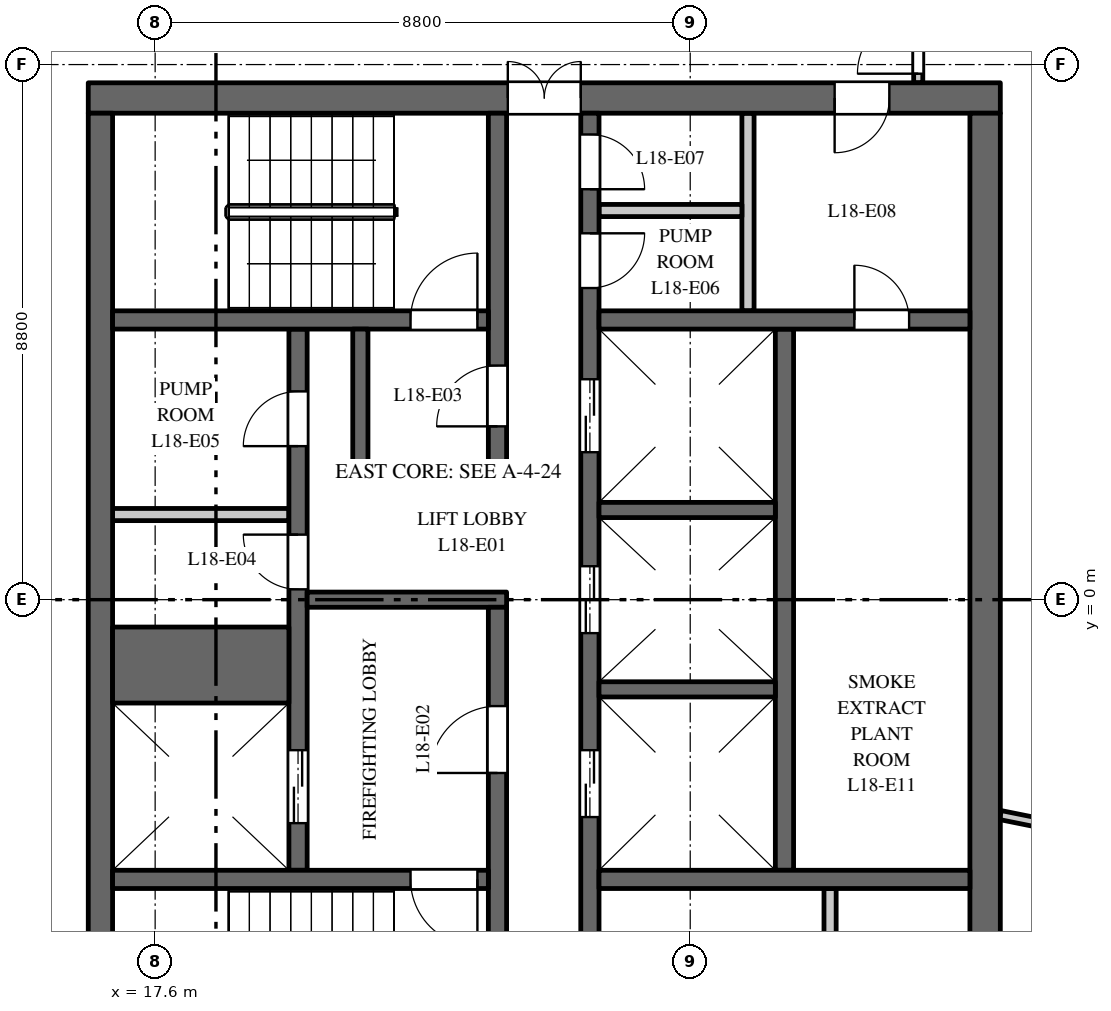
"""IFC4 building model, lengths in metres.
Left out: names, types, materials, properties, quantities, classifications, styles, units other than length and angle.
Written with IfcOpenShell. Run it as: python <this file> out.ifc"""

import sys

from ifc_helpers import new_model, si_unit, direction, frame, frame_2d, origin, place, context, subcontext, project, spatial, rectangle, extrude, element, fill, save


model = new_model("IFC4")
c1 = context("Model", 3, precision=1e-05, world=origin(), true_north=direction((0.0, 1.0)))
c2 = subcontext(c1, "Body", "Model", "MODEL_VIEW")
j1 = project(units=[si_unit("LENGTHUNIT", "METRE"), si_unit("PLANEANGLEUNIT", "RADIAN")], contexts=[c1])
p1 = place(None, origin())
s1 = spatial("IfcSite", under=j1, at=p1, CompositionType="ELEMENT")
p2 = place(p1, origin())
s2 = spatial("IfcBuilding", under=s1, at=p2, CompositionType="ELEMENT")
p3 = place(p2, frame((0.0, 0.0, 82.5)))
s3 = spatial("IfcBuildingStorey", under=s2, at=p3, CompositionType="ELEMENT", Elevation=82.5)
p4 = place(p3, frame((16.5, 8.25, 0.0), z_axis=(0.0, 0.0, 1.0), x_axis=(1.0, 0.0, 0.0)))
e1 = element("IfcWall", 1, at=p4, inside=s3, PredefinedType="SHEAR", context=c2, shape_type="SweptSolid", body=[
    extrude(rectangle(XDim=15.0, YDim=0.5, at=frame_2d((7.5, 0.0))), origin(), (0.0, 0.0, 1.0), 5.2),
])
p5 = place(p4, frame((6.9, 0.0, 0.0)))
e2 = element("IfcOpeningElement", 2, at=p5, cuts=e1, PredefinedType="OPENING", context=c2, shape_type="SweptSolid", body=[
    extrude(rectangle(XDim=1.2, YDim=2.1, at=frame_2d((0.6, 1.05))), frame((0.0, 0.26, 0.0), z_axis=(0.0, -1.0, 0.0), x_axis=(1.0, 0.0, 0.0)), (0.0, 0.0, 1.0), 0.52),
])
p6 = place(p4, frame((12.275, 0.0, 0.0)))
e3 = element("IfcOpeningElement", 3, at=p6, cuts=e1, PredefinedType="OPENING", context=c2, shape_type="SweptSolid", body=[
    extrude(rectangle(XDim=0.9, YDim=2.1, at=frame_2d((0.45, 1.05))), frame((0.0, 0.26, 0.0), z_axis=(0.0, -1.0, 0.0), x_axis=(1.0, 0.0, 0.0)), (0.0, 0.0, 1.0), 0.52),
])
p7 = place(p3, frame((16.9, 1.4, 0.0), z_axis=(0.0, 0.0, 1.0), x_axis=(1.0, 0.0, 0.0)))
e4 = element("IfcWall", 4, at=p7, inside=s3, PredefinedType="PARTITIONING", context=c2, shape_type="SweptSolid", body=[
    extrude(rectangle(XDim=2.9, YDim=0.2, at=frame_2d((1.45, 0.0))), origin(), (0.0, 0.0, 1.0), 5.2),
])
p8 = place(p3, frame((27.95, -4.45, 0.0), z_axis=(0.0, 0.0, 1.0), x_axis=(0.0, 1.0, 0.0)))
e5 = element("IfcWall", 5, at=p8, inside=s3, PredefinedType="SHEAR", context=c2, shape_type="SweptSolid", body=[
    extrude(rectangle(XDim=8.9, YDim=0.3, at=frame_2d((4.45, 0.0))), origin(), (0.0, 0.0, 1.0), 5.2),
])
p9 = place(p3, frame((19.95, -4.45, 0.0), z_axis=(0.0, 0.0, 1.0), x_axis=(0.0, 1.0, 0.0)))
e6 = element("IfcWall", 6, at=p9, inside=s3, PredefinedType="SHEAR", context=c2, shape_type="SweptSolid", body=[
    extrude(rectangle(XDim=8.9, YDim=0.3, at=frame_2d((4.45, 0.0))), origin(), (0.0, 0.0, 1.0), 5.2),
])
p10 = place(p9, frame((0.775, 0.0, 0.0)))
e7 = element("IfcOpeningElement", 7, at=p10, cuts=e6, PredefinedType="OPENING", context=c2, shape_type="SweptSolid", body=[
    extrude(rectangle(XDim=1.2, YDim=2.1, at=frame_2d((0.6, 1.05))), frame((0.0, 0.16, 0.0), z_axis=(0.0, -1.0, 0.0), x_axis=(1.0, 0.0, 0.0)), (0.0, 0.0, 1.0), 0.32),
])
p11 = place(p9, frame((4.62, 0.0, 0.0)))
e8 = element("IfcOpeningElement", 8, at=p11, cuts=e6, PredefinedType="OPENING", context=c2, shape_type="SweptSolid", body=[
    extrude(rectangle(XDim=0.9, YDim=2.1, at=frame_2d((0.45, 1.05))), frame((0.0, 0.16, 0.0), z_axis=(0.0, -1.0, 0.0), x_axis=(1.0, 0.0, 0.0)), (0.0, 0.0, 1.0), 0.32),
])
p12 = place(p9, frame((6.975, 0.0, 0.0)))
e9 = element("IfcOpeningElement", 9, at=p12, cuts=e6, PredefinedType="OPENING", context=c2, shape_type="SweptSolid", body=[
    extrude(rectangle(XDim=0.9, YDim=2.1, at=frame_2d((0.45, 1.05))), frame((0.0, 0.16, 0.0), z_axis=(0.0, -1.0, 0.0), x_axis=(1.0, 0.0, 0.0)), (0.0, 0.0, 1.0), 0.32),
])
p13 = place(p3, frame((24.75, -8.0, 0.0), z_axis=(0.0, 0.0, 1.0), x_axis=(0.0, 1.0, 0.0)))
e10 = element("IfcWall", 10, at=p13, inside=s3, PredefinedType="SHEAR", context=c2, shape_type="SweptSolid", body=[
    extrude(rectangle(XDim=16.0, YDim=0.3, at=frame_2d((8.0, 0.0))), origin(), (0.0, 0.0, 1.0), 5.2),
])
p14 = place(p13, frame((4.425, 0.0, 0.0)))
e11 = element("IfcOpeningElement", 11, at=p14, cuts=e10, PredefinedType="OPENING", context=c2, shape_type="SweptSolid", body=[
    extrude(rectangle(XDim=1.1, YDim=2.1, at=frame_2d((0.55, 1.05))), frame((0.0, 0.16, 0.0), z_axis=(0.0, -1.0, 0.0), x_axis=(1.0, 0.0, 0.0)), (0.0, 0.0, 1.0), 0.32),
])
p15 = place(p13, frame((7.45, 0.0, 0.0)))
e12 = element("IfcOpeningElement", 12, at=p15, cuts=e10, PredefinedType="OPENING", context=c2, shape_type="SweptSolid", body=[
    extrude(rectangle(XDim=1.1, YDim=2.1, at=frame_2d((0.55, 1.05))), frame((0.0, 0.16, 0.0), z_axis=(0.0, -1.0, 0.0), x_axis=(1.0, 0.0, 0.0)), (0.0, 0.0, 1.0), 0.32),
])
p16 = place(p13, frame((10.425, 0.0, 0.0)))
e13 = element("IfcOpeningElement", 13, at=p16, cuts=e10, PredefinedType="OPENING", context=c2, shape_type="SweptSolid", body=[
    extrude(rectangle(XDim=1.2, YDim=2.1, at=frame_2d((0.6, 1.05))), frame((0.0, 0.16, 0.0), z_axis=(0.0, -1.0, 0.0), x_axis=(1.0, 0.0, 0.0)), (0.0, 0.0, 1.0), 0.32),
])
p17 = place(p13, frame((13.125, 0.0, 0.0)))
e14 = element("IfcOpeningElement", 14, at=p17, cuts=e10, PredefinedType="OPENING", context=c2, shape_type="SweptSolid", body=[
    extrude(rectangle(XDim=0.9, YDim=2.1, at=frame_2d((0.45, 1.05))), frame((0.0, 0.16, 0.0), z_axis=(0.0, -1.0, 0.0), x_axis=(1.0, 0.0, 0.0)), (0.0, 0.0, 1.0), 0.32),
])
p18 = place(p13, frame((14.75, 0.0, 0.0)))
e15 = element("IfcOpeningElement", 15, at=p18, cuts=e10, PredefinedType="OPENING", context=c2, shape_type="SweptSolid", body=[
    extrude(rectangle(XDim=0.9, YDim=2.1, at=frame_2d((0.45, 1.05))), frame((0.0, 0.16, 0.0), z_axis=(0.0, -1.0, 0.0), x_axis=(1.0, 0.0, 0.0)), (0.0, 0.0, 1.0), 0.32),
])
p19 = place(p13, frame((1.35, 0.0, 0.0)))
e16 = element("IfcOpeningElement", 16, at=p19, cuts=e10, PredefinedType="OPENING", context=c2, shape_type="SweptSolid", body=[
    extrude(rectangle(XDim=0.9, YDim=2.1, at=frame_2d((0.45, 1.05))), frame((0.0, 0.16, 0.0), z_axis=(0.0, -1.0, 0.0), x_axis=(1.0, 0.0, 0.0)), (0.0, 0.0, 1.0), 0.32),
])
p20 = place(p3, frame((20.1, 0.0, 0.0), z_axis=(0.0, 0.0, 1.0), x_axis=(1.0, 0.0, 0.0)))
e17 = element("IfcWall", 17, at=p20, inside=s3, PredefinedType="SHEAR", context=c2, shape_type="SweptSolid", body=[
    extrude(rectangle(XDim=3.28, YDim=0.25, at=frame_2d((1.64, 0.0))), origin(), (0.0, 0.0, 1.0), 5.2),
])
p21 = place(p3, frame((16.7, -8.0, 0.0), z_axis=(0.0, 0.0, 1.0), x_axis=(0.0, 1.0, 0.0)))
e18 = element("IfcWall", 18, at=p21, inside=s3, PredefinedType="SHEAR", context=c2, shape_type="SweptSolid", body=[
    extrude(rectangle(XDim=16.0, YDim=0.4, at=frame_2d((8.0, 0.0))), origin(), (0.0, 0.0, 1.0), 5.2),
])
p22 = place(p3, frame((31.25, -8.0, 0.0), z_axis=(0.0, 0.0, 1.0), x_axis=(0.0, 1.0, 0.0)))
e19 = element("IfcWall", 19, at=p22, inside=s3, PredefinedType="SHEAR", context=c2, shape_type="SweptSolid", body=[
    extrude(rectangle(XDim=16.0, YDim=0.5, at=frame_2d((8.0, 0.0))), origin(), (0.0, 0.0, 1.0), 5.2),
])
p23 = place(p3, frame((24.9, 4.6, 0.0), z_axis=(0.0, 0.0, 1.0), x_axis=(1.0, 0.0, 0.0)))
e20 = element("IfcWall", 20, at=p23, inside=s3, PredefinedType="SHEAR", context=c2, shape_type="SweptSolid", body=[
    extrude(rectangle(XDim=6.1, YDim=0.3, at=frame_2d((3.05, 0.0))), origin(), (0.0, 0.0, 1.0), 5.2),
])
p24 = place(p23, frame((4.2, 0.0, 0.0)))
e21 = element("IfcOpeningElement", 21, at=p24, cuts=e20, PredefinedType="OPENING", context=c2, shape_type="SweptSolid", body=[
    extrude(rectangle(XDim=0.9, YDim=2.1, at=frame_2d((0.45, 1.05))), frame((0.0, 0.16, 0.0), z_axis=(0.0, -1.0, 0.0), x_axis=(1.0, 0.0, 0.0)), (0.0, 0.0, 1.0), 0.32),
])
for number, where, z_axis, x_axis in (
    (22, (27.35, 4.75, 0.0), (0.0, 0.0, 1.0), (0.0, 1.0, 0.0)),
    (23, (28.7, -8.0, 0.0), (0.0, 0.0, 1.0), (0.0, 1.0, 0.0)),
):
    element("IfcWall", number, at=place(p3, frame(where, z_axis=z_axis, x_axis=x_axis)), inside=s3, PredefinedType="PARTITIONING", context=c2, shape_type="SweptSolid", body=[
        extrude(rectangle(XDim=3.25, YDim=0.2, at=frame_2d((1.625, 0.0))), origin(), (0.0, 0.0, 1.0), 5.2),
    ])
p25 = place(p3, frame((24.9, 6.4, 0.0), z_axis=(0.0, 0.0, 1.0), x_axis=(1.0, 0.0, 0.0)))
e24 = element("IfcWall", 24, at=p25, inside=s3, PredefinedType="PARTITIONING", context=c2, shape_type="SweptSolid", body=[
    extrude(rectangle(XDim=2.35, YDim=0.2, at=frame_2d((1.175, 0.0))), origin(), (0.0, 0.0, 1.0), 5.2),
])
p26 = place(p3, frame((24.9, -4.6, 0.0), z_axis=(0.0, 0.0, 1.0), x_axis=(1.0, 0.0, 0.0)))
e25 = element("IfcWall", 25, at=p26, inside=s3, PredefinedType="SHEAR", context=c2, shape_type="SweptSolid", body=[
    extrude(rectangle(XDim=6.1, YDim=0.3, at=frame_2d((3.05, 0.0))), origin(), (0.0, 0.0, 1.0), 5.2),
])
p27 = place(p3, frame((16.9, -1.075, 0.0), z_axis=(0.0, 0.0, 1.0), x_axis=(1.0, 0.0, 0.0)))
e26 = element("IfcWall", 26, at=p27, inside=s3, PredefinedType="SHEAR", context=c2, shape_type="SweptSolid", body=[
    extrude(rectangle(XDim=2.9, YDim=1.25, at=frame_2d((1.45, 0.0))), origin(), (0.0, 0.0, 1.0), 5.2),
])
for number, where, z_axis, x_axis in (
    (27, (24.9, -1.475, 0.0), (0.0, 0.0, 1.0), (1.0, 0.0, 0.0)),
    (28, (24.9, 1.475, 0.0), (0.0, 0.0, 1.0), (1.0, 0.0, 0.0)),
):
    element("IfcWall", number, at=place(p3, frame(where, z_axis=z_axis, x_axis=x_axis)), inside=s3, PredefinedType="SHEAR", context=c2, shape_type="SweptSolid", body=[
        extrude(rectangle(XDim=2.9, YDim=0.25, at=frame_2d((1.45, 0.0))), origin(), (0.0, 0.0, 1.0), 5.2),
    ])
p28 = place(p3, frame((23.23, 2.25, 0.0), z_axis=(0.0, 0.0, 1.0), x_axis=(0.0, 1.0, 0.0)))
e29 = element("IfcWall", 29, at=p28, inside=s3, PredefinedType="SHEAR", context=c2, shape_type="SweptSolid", body=[
    extrude(rectangle(XDim=5.75, YDim=0.3, at=frame_2d((2.875, 0.0))), origin(), (0.0, 0.0, 1.0), 5.2),
])
p29 = place(p28, frame((0.6, 0.0, 0.0)))
e30 = element("IfcOpeningElement", 30, at=p29, cuts=e29, PredefinedType="OPENING", context=c2, shape_type="SweptSolid", body=[
    extrude(rectangle(XDim=1.0, YDim=2.1, at=frame_2d((0.5, 1.05))), frame((0.0, 0.16, 0.0), z_axis=(0.0, -1.0, 0.0), x_axis=(1.0, 0.0, 0.0)), (0.0, 0.0, 1.0), 0.32),
])
p30 = place(p3, frame((23.23, -8.0, 0.0), z_axis=(0.0, 0.0, 1.0), x_axis=(0.0, 1.0, 0.0)))
e31 = element("IfcWall", 31, at=p30, inside=s3, PredefinedType="SHEAR", context=c2, shape_type="SweptSolid", body=[
    extrude(rectangle(XDim=7.875, YDim=0.3, at=frame_2d((3.938, 0.0))), origin(), (0.0, 0.0, 1.0), 5.2),
])
p31 = place(p30, frame((5.15, 0.0, 0.0)))
e32 = element("IfcOpeningElement", 32, at=p31, cuts=e31, PredefinedType="OPENING", context=c2, shape_type="SweptSolid", body=[
    extrude(rectangle(XDim=1.1, YDim=2.1, at=frame_2d((0.55, 1.05))), frame((0.0, 0.16, 0.0), z_axis=(0.0, -1.0, 0.0), x_axis=(1.0, 0.0, 0.0)), (0.0, 0.0, 1.0), 0.32),
])
p32 = place(p3, frame((16.9, 4.6, 0.0), z_axis=(0.0, 0.0, 1.0), x_axis=(1.0, 0.0, 0.0)))
e33 = element("IfcWall", 33, at=p32, inside=s3, PredefinedType="SHEAR", context=c2, shape_type="SweptSolid", body=[
    extrude(rectangle(XDim=6.18, YDim=0.3, at=frame_2d((3.09, 0.0))), origin(), (0.0, 0.0, 1.0), 5.2),
])
p33 = place(p32, frame((4.9, 0.0, 0.0)))
e34 = element("IfcOpeningElement", 34, at=p33, cuts=e33, PredefinedType="OPENING", context=c2, shape_type="SweptSolid", body=[
    extrude(rectangle(XDim=1.1, YDim=2.1, at=frame_2d((0.55, 1.05))), frame((0.0, 0.16, 0.0), z_axis=(0.0, -1.0, 0.0), x_axis=(1.0, 0.0, 0.0)), (0.0, 0.0, 1.0), 0.32),
])
p34 = place(p3, frame((16.9, -4.6, 0.0), z_axis=(0.0, 0.0, 1.0), x_axis=(1.0, 0.0, 0.0)))
e35 = element("IfcWall", 35, at=p34, inside=s3, PredefinedType="SHEAR", context=c2, shape_type="SweptSolid", body=[
    extrude(rectangle(XDim=6.18, YDim=0.3, at=frame_2d((3.09, 0.0))), origin(), (0.0, 0.0, 1.0), 5.2),
])
p35 = place(p34, frame((4.9, 0.0, 0.0)))
e36 = element("IfcOpeningElement", 36, at=p35, cuts=e35, PredefinedType="OPENING", context=c2, shape_type="SweptSolid", body=[
    extrude(rectangle(XDim=1.1, YDim=2.1, at=frame_2d((0.55, 1.05))), frame((0.0, 0.16, 0.0), z_axis=(0.0, -1.0, 0.0), x_axis=(1.0, 0.0, 0.0)), (0.0, 0.0, 1.0), 0.32),
])
p36 = place(p3, frame((20.85, 2.125, 0.0), z_axis=(0.0, 0.0, 1.0), x_axis=(1.0, 0.0, 0.0)))
e37 = element("IfcWall", 37, at=p36, inside=s3, PredefinedType="SHEAR", context=c2, shape_type="SweptSolid", body=[
    extrude(rectangle(XDim=2.53, YDim=0.25, at=frame_2d((1.265, 0.0))), origin(), (0.0, 0.0, 1.0), 5.2),
])
p37 = place(p3, frame((20.975, 2.25, 0.0), z_axis=(0.0, 0.0, 1.0), x_axis=(0.0, 1.0, 0.0)))
e38 = element("IfcWall", 38, at=p37, inside=s3, PredefinedType="SHEAR", context=c2, shape_type="SweptSolid", body=[
    extrude(rectangle(XDim=2.2, YDim=0.25, at=frame_2d((1.1, 0.0))), origin(), (0.0, 0.0, 1.0), 5.2),
])
p38 = place(p3, frame((31.5, -3.542, 0.0), z_axis=(0.0, 0.0, 1.0), x_axis=(0.98034430806, -0.197294291997, 0.0)))
e39 = element("IfcWall", 39, at=p38, inside=s3, PredefinedType="PARTITIONING", context=c2, shape_type="SweptSolid", body=[
    extrude(rectangle(XDim=3.188, YDim=0.15, at=frame_2d((1.594, 0.0))), origin(), (0.0, 0.0, 1.0), 5.2),
])
p39 = place(p3, frame((30.15, 8.5, 0.0), z_axis=(0.0, 0.0, 1.0), x_axis=(0.0, 1.0, 0.0)))
e40 = element("IfcWall", 40, at=p39, inside=s3, PredefinedType="PARTITIONING", context=c2, shape_type="SweptSolid", body=[
    extrude(rectangle(XDim=2.2, YDim=0.15, at=frame_2d((1.1, 0.0))), origin(), (0.0, 0.0, 1.0), 5.2),
])
p40 = place(p39, frame((0.15, 0.0, 0.0)))
e41 = element("IfcOpeningElement", 41, at=p40, cuts=e40, PredefinedType="OPENING", context=c2, shape_type="SweptSolid", body=[
    extrude(rectangle(XDim=1.0, YDim=2.1, at=frame_2d((0.5, 1.05))), frame((0.0, 0.085, 0.0), z_axis=(0.0, -1.0, 0.0), x_axis=(1.0, 0.0, 0.0)), (0.0, 0.0, 1.0), 0.17),
])
p41 = place(p10, origin())
e42 = element("IfcDoor", 42, at=p41, inside=s3, OperationType="DOUBLE_DOOR_SLIDING", PredefinedType="DOOR", context=c2, shape_type="SweptSolid", body=[
    extrude(rectangle(XDim=1.2, YDim=2.1, at=frame_2d((0.6, 1.05))), frame((0.0, 0.025, 0.0), z_axis=(0.0, -1.0, 0.0), x_axis=(1.0, 0.0, 0.0)), (0.0, 0.0, 1.0), 0.05),
])
fill(e7, e42)
p42 = place(p14, origin())
e43 = element("IfcDoor", 43, at=p42, inside=s3, OperationType="DOUBLE_DOOR_SLIDING", PredefinedType="DOOR", context=c2, shape_type="SweptSolid", body=[
    extrude(rectangle(XDim=1.1, YDim=2.1, at=frame_2d((0.55, 1.05))), frame((0.0, 0.025, 0.0), z_axis=(0.0, -1.0, 0.0), x_axis=(1.0, 0.0, 0.0)), (0.0, 0.0, 1.0), 0.05),
])
fill(e11, e43)
p43 = place(p15, origin())
e44 = element("IfcDoor", 44, at=p43, inside=s3, OperationType="DOUBLE_DOOR_SLIDING", PredefinedType="DOOR", context=c2, shape_type="SweptSolid", body=[
    extrude(rectangle(XDim=1.1, YDim=2.1, at=frame_2d((0.55, 1.05))), frame((0.0, 0.025, 0.0), z_axis=(0.0, -1.0, 0.0), x_axis=(1.0, 0.0, 0.0)), (0.0, 0.0, 1.0), 0.05),
])
fill(e12, e44)
p44 = place(p16, origin())
e45 = element("IfcDoor", 45, at=p44, inside=s3, OperationType="DOUBLE_DOOR_SLIDING", PredefinedType="DOOR", context=c2, shape_type="SweptSolid", body=[
    extrude(rectangle(XDim=1.2, YDim=2.1, at=frame_2d((0.6, 1.05))), frame((0.0, 0.025, 0.0), z_axis=(0.0, -1.0, 0.0), x_axis=(1.0, 0.0, 0.0)), (0.0, 0.0, 1.0), 0.05),
])
fill(e13, e45)
p45 = place(p33, origin())
e46 = element("IfcDoor", 46, at=p45, inside=s3, OperationType="SINGLE_SWING_LEFT", PredefinedType="DOOR", context=c2, shape_type="SweptSolid", body=[
    extrude(rectangle(XDim=1.1, YDim=2.1, at=frame_2d((0.55, 1.05))), frame((0.0, 0.025, 0.0), z_axis=(0.0, -1.0, 0.0), x_axis=(1.0, 0.0, 0.0)), (0.0, 0.0, 1.0), 0.05),
])
fill(e34, e46)
p46 = place(p35, origin())
e47 = element("IfcDoor", 47, at=p46, inside=s3, OperationType="SINGLE_SWING_RIGHT", PredefinedType="DOOR", context=c2, shape_type="SweptSolid", body=[
    extrude(rectangle(XDim=1.1, YDim=2.1, at=frame_2d((0.55, 1.05))), frame((0.0, 0.025, 0.0), z_axis=(0.0, -1.0, 0.0), x_axis=(1.0, 0.0, 0.0)), (0.0, 0.0, 1.0), 0.05),
])
fill(e36, e47)
p47 = place(p31, origin())
e48 = element("IfcDoor", 48, at=p47, inside=s3, OperationType="SINGLE_SWING_RIGHT", PredefinedType="DOOR", context=c2, shape_type="SweptSolid", body=[
    extrude(rectangle(XDim=1.1, YDim=2.1, at=frame_2d((0.55, 1.05))), frame((0.0, 0.025, 0.0), z_axis=(0.0, -1.0, 0.0), x_axis=(1.0, 0.0, 0.0)), (0.0, 0.0, 1.0), 0.05),
])
fill(e32, e48)
p48 = place(p29, origin())
e49 = element("IfcDoor", 49, at=p48, inside=s3, OperationType="SINGLE_SWING_RIGHT", PredefinedType="DOOR", context=c2, shape_type="SweptSolid", body=[
    extrude(rectangle(XDim=1.0, YDim=2.1, at=frame_2d((0.5, 1.05))), frame((0.0, 0.025, 0.0), z_axis=(0.0, -1.0, 0.0), x_axis=(1.0, 0.0, 0.0)), (0.0, 0.0, 1.0), 0.05),
])
fill(e30, e49)
p49 = place(p5, origin())
e50 = element("IfcDoor", 50, at=p49, inside=s3, OperationType="DOUBLE_DOOR_DOUBLE_SWING", PredefinedType="DOOR", context=c2, shape_type="SweptSolid", body=[
    extrude(rectangle(XDim=1.2, YDim=2.1, at=frame_2d((0.6, 1.05))), frame((0.0, 0.025, 0.0), z_axis=(0.0, -1.0, 0.0), x_axis=(1.0, 0.0, 0.0)), (0.0, 0.0, 1.0), 0.05),
])
fill(e2, e50)
p50 = place(p11, origin())
e51 = element("IfcDoor", 51, at=p50, inside=s3, OperationType="SINGLE_SWING_LEFT", PredefinedType="DOOR", context=c2, shape_type="SweptSolid", body=[
    extrude(rectangle(XDim=0.9, YDim=2.1, at=frame_2d((0.45, 1.05))), frame((0.0, 0.025, 0.0), z_axis=(0.0, -1.0, 0.0), x_axis=(1.0, 0.0, 0.0)), (0.0, 0.0, 1.0), 0.05),
])
fill(e8, e51)
p51 = place(p12, origin())
e52 = element("IfcDoor", 52, at=p51, inside=s3, OperationType="SINGLE_SWING_RIGHT", PredefinedType="DOOR", context=c2, shape_type="SweptSolid", body=[
    extrude(rectangle(XDim=0.9, YDim=2.1, at=frame_2d((0.45, 1.05))), frame((0.0, 0.025, 0.0), z_axis=(0.0, -1.0, 0.0), x_axis=(1.0, 0.0, 0.0)), (0.0, 0.0, 1.0), 0.05),
])
fill(e9, e52)
p52 = place(p17, origin())
e53 = element("IfcDoor", 53, at=p52, inside=s3, OperationType="SINGLE_SWING_RIGHT", PredefinedType="DOOR", context=c2, shape_type="SweptSolid", body=[
    extrude(rectangle(XDim=0.9, YDim=2.1, at=frame_2d((0.45, 1.05))), frame((0.0, 0.025, 0.0), z_axis=(0.0, -1.0, 0.0), x_axis=(1.0, 0.0, 0.0)), (0.0, 0.0, 1.0), 0.05),
])
fill(e14, e53)
p53 = place(p18, origin())
e54 = element("IfcDoor", 54, at=p53, inside=s3, OperationType="SINGLE_SWING_LEFT", PredefinedType="DOOR", context=c2, shape_type="SweptSolid", body=[
    extrude(rectangle(XDim=0.9, YDim=2.1, at=frame_2d((0.45, 1.05))), frame((0.0, 0.025, 0.0), z_axis=(0.0, -1.0, 0.0), x_axis=(1.0, 0.0, 0.0)), (0.0, 0.0, 1.0), 0.05),
])
fill(e15, e54)
p54 = place(p6, origin())
e55 = element("IfcDoor", 55, at=p54, inside=s3, OperationType="SINGLE_SWING_LEFT", PredefinedType="DOOR", context=c2, shape_type="SweptSolid", body=[
    extrude(rectangle(XDim=0.9, YDim=2.1, at=frame_2d((0.45, 1.05))), frame((0.0, 0.025, 0.0), z_axis=(0.0, -1.0, 0.0), x_axis=(1.0, 0.0, 0.0)), (0.0, 0.0, 1.0), 0.05),
])
fill(e3, e55)
p55 = place(p24, origin())
e56 = element("IfcDoor", 56, at=p55, inside=s3, OperationType="SINGLE_SWING_RIGHT", PredefinedType="DOOR", context=c2, shape_type="SweptSolid", body=[
    extrude(rectangle(XDim=0.9, YDim=2.1, at=frame_2d((0.45, 1.05))), frame((0.0, 0.025, 0.0), z_axis=(0.0, -1.0, 0.0), x_axis=(1.0, 0.0, 0.0)), (0.0, 0.0, 1.0), 0.05),
])
fill(e21, e56)
p56 = place(p40, origin())
e57 = element("IfcDoor", 57, at=p56, inside=s3, OperationType="SINGLE_SWING_LEFT", PredefinedType="DOOR", context=c2, shape_type="SweptSolid", body=[
    extrude(rectangle(XDim=1.0, YDim=2.1, at=frame_2d((0.5, 1.05))), frame((0.0, 0.025, 0.0), z_axis=(0.0, -1.0, 0.0), x_axis=(1.0, 0.0, 0.0)), (0.0, 0.0, 1.0), 0.05),
])
fill(e41, e57)
save(model, sys.argv[1])
